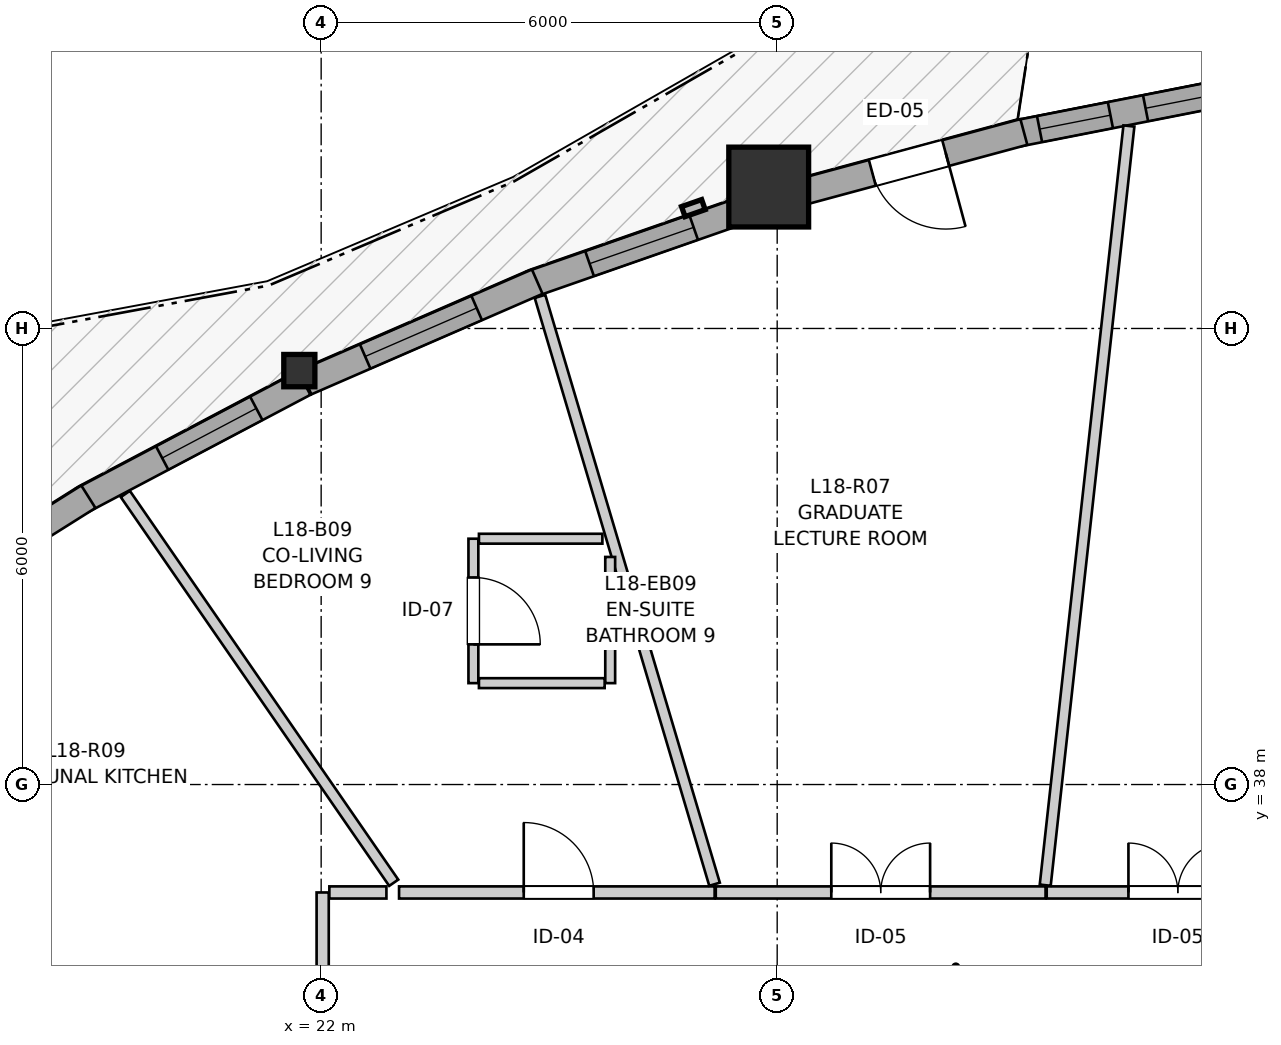
"""IFC4 building model, lengths in metres.
Left out: names, types, materials, properties, quantities, classifications, styles, units other than length and angle.
Written with IfcOpenShell. Run it as: python <this file> out.ifc"""

import sys

from ifc_helpers import new_model, si_unit, direction, frame, frame_2d, origin, origin_2d, place, context, subcontext, project, spatial, rectangle, i_section, extrude, source, transform, mapped, element, fill, save


model = new_model("IFC4")
c1 = context("Model", 3, precision=1e-05, world=origin(), true_north=direction((0.0, 1.0)))
c2 = subcontext(c1, "Body", "Model", "MODEL_VIEW")
j1 = project(units=[si_unit("LENGTHUNIT", "METRE"), si_unit("PLANEANGLEUNIT", "RADIAN")], contexts=[c1])
p1 = place(None, origin())
s1 = spatial("IfcSite", under=j1, at=p1, CompositionType="ELEMENT")
p2 = place(p1, origin())
s2 = spatial("IfcBuilding", under=s1, at=p2, CompositionType="ELEMENT")
p3 = place(p2, frame((0.0, 0.0, 62.2)))
s3 = spatial("IfcBuildingStorey", under=s2, at=p3, CompositionType="ELEMENT", Elevation=62.2)
m1 = source(origin(), c2, "Body", "SweptSolid", [
    extrude(rectangle(XDim=1.05, YDim=1.05, at=origin_2d()), origin(), (0.0, 0.0, 1.0), 2.9),
])
p4 = place(p3, frame((27.888, 45.861, 0.0), z_axis=(0.0, 0.0, 1.0), x_axis=(1.0, 0.0, 0.0)))
e1 = element("IfcColumn", 1, at=p4, inside=s3, PredefinedType="COLUMN", context=c2, shape_type="MappedRepresentation", body=[
    mapped(m1, transform((0.0, 0.0, 0.0), x_axis=(1.0, 0.0, 0.0), y_axis=(0.0, 1.0, 0.0), z_axis=(0.0, 0.0, 1.0), scale=1.0)),
])
m2 = source(origin(), c2, "Body", "SweptSolid", [
    extrude(i_section(OverallWidth=0.409, OverallDepth=0.425, WebThickness=0.03, FlangeThickness=0.048, FilletRadius=0.015, at=origin_2d()), origin(), (0.0, 0.0, 1.0), 2.9),
])
p5 = place(p3, frame((21.713, 43.446, 0.0), z_axis=(0.0, 0.0, 1.0), x_axis=(1.0, 0.0, 0.0)))
e2 = element("IfcColumn", 2, at=p5, inside=s3, PredefinedType="PILASTER", context=c2, shape_type="MappedRepresentation", body=[
    mapped(m2, transform((0.0, 0.0, 0.0), x_axis=(1.0, 0.0, 0.0), y_axis=(0.0, 1.0, 0.0), z_axis=(0.0, 0.0, 1.0), scale=1.0)),
])
p6 = place(p3, frame((34.577, 47.237, 0.0), z_axis=(0.0, 0.0, 1.0), x_axis=(-0.981238400755, -0.192798342532, 0.0)))
e3 = element("IfcWall", 3, at=p6, inside=s3, PredefinedType="SOLIDWALL", context=c2, shape_type="SweptSolid", body=[
    extrude(rectangle(XDim=3.482, YDim=0.35, at=frame_2d((1.741, 0.0))), origin(), (0.0, 0.0, 1.0), 2.38),
])
p7 = place(p6, frame((0.313, 0.0, 0.82)))
e4 = element("IfcOpeningElement", 4, at=p7, cuts=e3, PredefinedType="OPENING", context=c2, shape_type="SweptSolid", body=[
    extrude(rectangle(XDim=1.45, YDim=1.25, at=frame_2d((0.725, 0.625))), frame((0.0, 0.185, 0.0), z_axis=(0.0, -1.0, 0.0), x_axis=(1.0, 0.0, 0.0)), (0.0, 0.0, 1.0), 0.37),
])
p8 = place(p6, frame((2.234, 0.0, 0.82)))
e5 = element("IfcOpeningElement", 5, at=p8, cuts=e3, PredefinedType="OPENING", context=c2, shape_type="SweptSolid", body=[
    extrude(rectangle(XDim=0.95, YDim=1.35, at=frame_2d((0.475, 0.675))), frame((0.0, 0.185, 0.0), z_axis=(0.0, -1.0, 0.0), x_axis=(1.0, 0.0, 0.0)), (0.0, 0.0, 1.0), 0.37),
])
p9 = place(p3, frame((31.246, 46.585, 0.0), z_axis=(0.0, 0.0, 1.0), x_axis=(-0.965469506164, -0.260516089076, 0.0)))
e6 = element("IfcWall", 6, at=p9, inside=s3, PredefinedType="SOLIDWALL", context=c2, shape_type="SweptSolid", body=[
    extrude(rectangle(XDim=3.13, YDim=0.35, at=frame_2d((1.565, 0.0))), origin(), (0.0, 0.0, 1.0), 2.38),
])
p10 = place(p9, frame((1.065, 0.0, 0.0)))
e7 = element("IfcOpeningElement", 7, at=p10, cuts=e6, PredefinedType="OPENING", context=c2, shape_type="SweptSolid", body=[
    extrude(rectangle(XDim=1.0, YDim=2.1, at=frame_2d((0.5, 1.05))), frame((0.0, 0.185, 0.0), z_axis=(0.0, -1.0, 0.0), x_axis=(1.0, 0.0, 0.0)), (0.0, 0.0, 1.0), 0.37),
])
p11 = place(p3, frame((27.663, 45.596, 0.0), z_axis=(0.0, 0.0, 1.0), x_axis=(-0.944134113087, -0.329561491236, 0.0)))
e8 = element("IfcWall", 8, at=p11, inside=s3, PredefinedType="SOLIDWALL", context=c2, shape_type="SweptSolid", body=[
    extrude(rectangle(XDim=3.074, YDim=0.35, at=frame_2d((1.537, 0.0))), origin(), (0.0, 0.0, 1.0), 2.38),
])
p12 = place(p11, frame((0.807, 0.0, 0.82)))
e9 = element("IfcOpeningElement", 9, at=p12, cuts=e8, PredefinedType="OPENING", context=c2, shape_type="SweptSolid", body=[
    extrude(rectangle(XDim=1.45, YDim=1.25, at=frame_2d((0.725, 0.625))), frame((0.0, 0.185, 0.0), z_axis=(0.0, -1.0, 0.0), x_axis=(1.0, 0.0, 0.0)), (0.0, 0.0, 1.0), 0.37),
])
p13 = place(p3, frame((24.843, 44.615, 0.0), z_axis=(0.0, 0.0, 1.0), x_axis=(-0.917119193404, -0.398613076918, 0.0)))
e10 = element("IfcWall", 10, at=p13, inside=s3, PredefinedType="SOLIDWALL", context=c2, shape_type="SweptSolid", body=[
    extrude(rectangle(XDim=3.317, YDim=0.35, at=frame_2d((1.659, 0.0))), origin(), (0.0, 0.0, 1.0), 2.38),
])
p14 = place(p13, frame((0.869, 0.0, 0.82)))
e11 = element("IfcOpeningElement", 11, at=p14, cuts=e10, PredefinedType="OPENING", context=c2, shape_type="SweptSolid", body=[
    extrude(rectangle(XDim=1.6, YDim=1.35, at=frame_2d((0.8, 0.675))), frame((0.0, 0.185, 0.0), z_axis=(0.0, -1.0, 0.0), x_axis=(1.0, 0.0, 0.0)), (0.0, 0.0, 1.0), 0.37),
])
p15 = place(p3, frame((21.777, 43.281, 0.0), z_axis=(0.0, 0.0, 1.0), x_axis=(-0.884381357857, -0.466765052113, 0.0)))
e12 = element("IfcWall", 12, at=p15, inside=s3, PredefinedType="SOLIDWALL", context=c2, shape_type="SweptSolid", body=[
    extrude(rectangle(XDim=3.298, YDim=0.35, at=frame_2d((1.649, 0.0))), origin(), (0.0, 0.0, 1.0), 2.38),
])
p16 = place(p15, frame((0.713, 0.0, 0.82)))
e13 = element("IfcOpeningElement", 13, at=p16, cuts=e12, PredefinedType="OPENING", context=c2, shape_type="SweptSolid", body=[
    extrude(rectangle(XDim=1.4, YDim=1.35, at=frame_2d((0.7, 0.675))), frame((0.0, 0.185, 0.0), z_axis=(0.0, -1.0, 0.0), x_axis=(1.0, 0.0, 0.0)), (0.0, 0.0, 1.0), 0.37),
])
p17 = place(p3, frame((18.937, 41.787, 0.0), z_axis=(0.0, 0.0, 1.0), x_axis=(-0.84639489148, -0.532555807101, 0.0)))
e14 = element("IfcWall", 14, at=p17, inside=s3, PredefinedType="SOLIDWALL", context=c2, shape_type="SweptSolid", body=[
    extrude(rectangle(XDim=3.018, YDim=0.35, at=frame_2d((1.509, 0.0))), origin(), (0.0, 0.0, 1.0), 2.38),
])
p18 = place(p17, frame((0.889, 0.0, 0.82)))
e15 = element("IfcOpeningElement", 15, at=p18, cuts=e14, PredefinedType="OPENING", context=c2, shape_type="SweptSolid", body=[
    extrude(rectangle(XDim=1.25, YDim=1.35, at=frame_2d((0.625, 0.675))), frame((0.0, 0.185, 0.0), z_axis=(0.0, -1.0, 0.0), x_axis=(1.0, 0.0, 0.0)), (0.0, 0.0, 1.0), 0.37),
])
p19 = place(p3, frame((27.192, 36.58, 0.0), z_axis=(0.0, 0.0, 1.0), x_axis=(1.0, 0.0, 0.0)))
e16 = element("IfcWall", 16, at=p19, inside=s3, PredefinedType="PARTITIONING", context=c2, shape_type="SweptSolid", body=[
    extrude(rectangle(XDim=4.339, YDim=0.16, at=frame_2d((2.169, 0.0))), origin(), (0.0, 0.0, 1.0), 2.9),
])
p20 = place(p19, frame((1.52, 0.0, 0.0)))
e17 = element("IfcOpeningElement", 17, at=p20, cuts=e16, PredefinedType="OPENING", context=c2, shape_type="SweptSolid", body=[
    extrude(rectangle(XDim=1.3, YDim=2.1, at=frame_2d((0.65, 1.05))), frame((0.0, 0.09, 0.0), z_axis=(0.0, -1.0, 0.0), x_axis=(1.0, 0.0, 0.0)), (0.0, 0.0, 1.0), 0.18),
])
p21 = place(p3, frame((23.025, 36.58, 0.0), z_axis=(0.0, 0.0, 1.0), x_axis=(1.0, 0.0, 0.0)))
e18 = element("IfcWall", 18, at=p21, inside=s3, PredefinedType="PARTITIONING", context=c2, shape_type="SweptSolid", body=[
    extrude(rectangle(XDim=4.152, YDim=0.16, at=frame_2d((2.076, 0.0))), origin(), (0.0, 0.0, 1.0), 2.508),
])
p22 = place(p21, frame((1.64, 0.0, 0.0)))
e19 = element("IfcOpeningElement", 19, at=p22, cuts=e18, PredefinedType="OPENING", context=c2, shape_type="SweptSolid", body=[
    extrude(rectangle(XDim=0.92, YDim=2.1, at=frame_2d((0.46, 1.05))), frame((0.0, 0.09, 0.0), z_axis=(0.0, -1.0, 0.0), x_axis=(1.0, 0.0, 0.0)), (0.0, 0.0, 1.0), 0.18),
])
p23 = place(p3, frame((22.02, 32.578, 0.0), z_axis=(0.0, 0.0, 1.0), x_axis=(0.0, 1.0, 0.0)))
e20 = element("IfcWall", 20, at=p23, inside=s3, PredefinedType="PARTITIONING", context=c2, shape_type="SweptSolid", body=[
    extrude(rectangle(XDim=4.002, YDim=0.16, at=frame_2d((2.001, 0.0))), origin(), (0.0, 0.0, 1.0), 2.9),
])
p24 = place(p23, frame((1.361, 0.0, 0.0)))
e21 = element("IfcOpeningElement", 21, at=p24, cuts=e20, PredefinedType="OPENING", context=c2, shape_type="SweptSolid", body=[
    extrude(rectangle(XDim=1.3, YDim=2.1, at=frame_2d((0.65, 1.05))), frame((0.0, 0.09, 0.0), z_axis=(0.0, -1.0, 0.0), x_axis=(1.0, 0.0, 0.0)), (0.0, 0.0, 1.0), 0.18),
])
p25 = place(p3, frame((31.546, 36.58, 0.0), z_axis=(0.0, 0.0, 1.0), x_axis=(1.0, 0.0, 0.0)))
e22 = element("IfcWall", 22, at=p25, inside=s3, PredefinedType="PARTITIONING", context=c2, shape_type="SweptSolid", body=[
    extrude(rectangle(XDim=3.45, YDim=0.16, at=frame_2d((1.725, 0.0))), origin(), (0.0, 0.0, 1.0), 2.9),
])
p26 = place(p25, frame((1.075, 0.0, 0.0)))
e23 = element("IfcOpeningElement", 23, at=p26, cuts=e22, PredefinedType="OPENING", context=c2, shape_type="SweptSolid", body=[
    extrude(rectangle(XDim=1.3, YDim=2.1, at=frame_2d((0.65, 1.05))), frame((0.0, 0.09, 0.0), z_axis=(0.0, -1.0, 0.0), x_axis=(1.0, 0.0, 0.0)), (0.0, 0.0, 1.0), 0.18),
])
p27 = place(p3, frame((24.003, 41.234, 0.0), z_axis=(0.0, 0.0, 1.0), x_axis=(0.0, -1.0, 0.0)))
e24 = element("IfcWall", 24, at=p27, inside=s3, PredefinedType="PARTITIONING", context=c2, shape_type="SweptSolid", body=[
    extrude(rectangle(XDim=1.9, YDim=0.13, at=frame_2d((0.95, 0.0))), origin(), (0.0, 0.0, 1.0), 2.9),
])
p28 = place(p27, frame((0.51, 0.0, 0.0)))
e25 = element("IfcOpeningElement", 25, at=p28, cuts=e24, PredefinedType="OPENING", context=c2, shape_type="SweptSolid", body=[
    extrude(rectangle(XDim=0.88, YDim=2.05, at=frame_2d((0.44, 1.025))), frame((0.0, 0.075, 0.0), z_axis=(0.0, -1.0, 0.0), x_axis=(1.0, 0.0, 0.0)), (0.0, 0.0, 1.0), 0.15),
])
p29 = place(p3, frame((31.527, 36.676, 0.0), z_axis=(0.0, 0.0, 1.0), x_axis=(0.109575491405, 0.993978476469, 0.0)))
e26 = element("IfcWall", 26, at=p29, inside=s3, PredefinedType="PARTITIONING", context=c2, shape_type="SweptSolid", body=[
    extrude(rectangle(XDim=10.049, YDim=0.145, at=frame_2d((5.024, 0.0))), origin(), (0.0, 0.0, 1.0), 2.9),
])
p30 = place(p3, frame((14.494, 38.558, 0.0), z_axis=(0.0, 0.0, 1.0), x_axis=(0.783879440631, -0.620913055552, 0.0)))
e27 = element("IfcWall", 27, at=p30, inside=s3, PredefinedType="PARTITIONING", context=c2, shape_type="SweptSolid", body=[
    extrude(rectangle(XDim=9.434, YDim=0.145, at=frame_2d((4.717, 0.0))), origin(), (0.0, 0.0, 1.0), 2.9),
])
p31 = place(p3, frame((24.879, 44.422, 0.0), z_axis=(0.0, 0.0, 1.0), x_axis=(0.284634354208, -0.958636158511, 0.0)))
e28 = element("IfcWall", 28, at=p31, inside=s3, PredefinedType="PARTITIONING", context=c2, shape_type="SweptSolid", body=[
    extrude(rectangle(XDim=8.068, YDim=0.145, at=frame_2d((4.034, 0.0))), origin(), (0.0, 0.0, 1.0), 2.9),
])
p32 = place(p3, frame((19.423, 41.823, 0.0), z_axis=(0.0, 0.0, 1.0), x_axis=(0.568159686118, -0.822918325881, 0.0)))
e29 = element("IfcWall", 29, at=p32, inside=s3, PredefinedType="PARTITIONING", context=c2, shape_type="SweptSolid", body=[
    extrude(rectangle(XDim=6.216, YDim=0.145, at=frame_2d((3.108, 0.0))), origin(), (0.0, 0.0, 1.0), 2.9),
])
p33 = place(p3, frame((25.803, 39.334, 0.0), z_axis=(0.0, 0.0, 1.0), x_axis=(0.0, 1.0, 0.0)))
e30 = element("IfcWall", 30, at=p33, inside=s3, PredefinedType="PARTITIONING", context=c2, shape_type="SweptSolid", body=[
    extrude(rectangle(XDim=1.66, YDim=0.13, at=frame_2d((0.83, 0.0))), origin(), (0.0, 0.0, 1.0), 2.9),
])
p34 = place(p3, frame((24.076, 41.234, 0.0), z_axis=(0.0, 0.0, 1.0), x_axis=(1.0, 0.0, 0.0)))
e31 = element("IfcWall", 31, at=p34, inside=s3, PredefinedType="PARTITIONING", context=c2, shape_type="SweptSolid", body=[
    extrude(rectangle(XDim=1.624, YDim=0.13, at=frame_2d((0.812, 0.0))), origin(), (0.0, 0.0, 1.0), 2.9),
])
p35 = place(p3, frame((24.076, 39.334, 0.0), z_axis=(0.0, 0.0, 1.0), x_axis=(1.0, 0.0, 0.0)))
e32 = element("IfcWall", 32, at=p35, inside=s3, PredefinedType="PARTITIONING", context=c2, shape_type="SweptSolid", body=[
    extrude(rectangle(XDim=1.654, YDim=0.13, at=frame_2d((0.827, 0.0))), origin(), (0.0, 0.0, 1.0), 2.9),
])
p36 = place(p3, frame((22.108, 36.58, 0.0), z_axis=(0.0, 0.0, 1.0), x_axis=(1.0, 0.0, 0.0)))
e33 = element("IfcWall", 33, at=p36, inside=s3, PredefinedType="PARTITIONING", context=c2, shape_type="SweptSolid", body=[
    extrude(rectangle(XDim=0.751, YDim=0.16, at=frame_2d((0.375, 0.0))), origin(), (0.0, 0.0, 1.0), 2.9),
])
m3 = source(origin(), c2, "Body", "SweptSolid", [
    extrude(rectangle(XDim=1.45, YDim=1.25, at=frame_2d((0.725, 0.625))), frame((0.0, 0.03, 0.0), z_axis=(0.0, -1.0, 0.0), x_axis=(1.0, 0.0, 0.0)), (0.0, 0.0, 1.0), 0.06),
])
p37 = place(p7, origin())
e34 = element("IfcWindow", 34, at=p37, inside=s3, PartitioningType="SINGLE_PANEL", PredefinedType="WINDOW", context=c2, shape_type="MappedRepresentation", body=[
    mapped(m3, transform((0.0, 0.0, 0.0), x_axis=(1.0, 0.0, 0.0), y_axis=(0.0, 1.0, 0.0), z_axis=(0.0, 0.0, 1.0), scale=1.0)),
])
fill(e4, e34)
m4 = source(origin(), c2, "Body", "SweptSolid", [
    extrude(rectangle(XDim=0.95, YDim=1.35, at=frame_2d((0.475, 0.675))), frame((0.0, 0.03, 0.0), z_axis=(0.0, -1.0, 0.0), x_axis=(1.0, 0.0, 0.0)), (0.0, 0.0, 1.0), 0.06),
])
p38 = place(p8, origin())
e35 = element("IfcWindow", 35, at=p38, inside=s3, PartitioningType="SINGLE_PANEL", PredefinedType="WINDOW", context=c2, shape_type="MappedRepresentation", body=[
    mapped(m4, transform((0.0, 0.0, 0.0), x_axis=(1.0, 0.0, 0.0), y_axis=(0.0, 1.0, 0.0), z_axis=(0.0, 0.0, 1.0), scale=1.0)),
])
fill(e5, e35)
p39 = place(p12, origin())
e36 = element("IfcWindow", 36, at=p39, inside=s3, PartitioningType="SINGLE_PANEL", PredefinedType="WINDOW", context=c2, shape_type="MappedRepresentation", body=[
    mapped(m3, transform((0.0, 0.0, 0.0), x_axis=(1.0, 0.0, 0.0), y_axis=(0.0, 1.0, 0.0), z_axis=(0.0, 0.0, 1.0), scale=1.0)),
])
fill(e9, e36)
m5 = source(origin(), c2, "Body", "SweptSolid", [
    extrude(rectangle(XDim=1.6, YDim=1.35, at=frame_2d((0.8, 0.675))), frame((0.0, 0.03, 0.0), z_axis=(0.0, -1.0, 0.0), x_axis=(1.0, 0.0, 0.0)), (0.0, 0.0, 1.0), 0.06),
])
p40 = place(p14, origin())
e37 = element("IfcWindow", 37, at=p40, inside=s3, PartitioningType="SINGLE_PANEL", PredefinedType="WINDOW", context=c2, shape_type="MappedRepresentation", body=[
    mapped(m5, transform((0.0, 0.0, 0.0), x_axis=(1.0, 0.0, 0.0), y_axis=(0.0, 1.0, 0.0), z_axis=(0.0, 0.0, 1.0), scale=1.0)),
])
fill(e11, e37)
m6 = source(origin(), c2, "Body", "SweptSolid", [
    extrude(rectangle(XDim=1.4, YDim=1.35, at=frame_2d((0.7, 0.675))), frame((0.0, 0.03, 0.0), z_axis=(0.0, -1.0, 0.0), x_axis=(1.0, 0.0, 0.0)), (0.0, 0.0, 1.0), 0.06),
])
p41 = place(p16, origin())
e38 = element("IfcWindow", 38, at=p41, inside=s3, PartitioningType="SINGLE_PANEL", PredefinedType="WINDOW", context=c2, shape_type="MappedRepresentation", body=[
    mapped(m6, transform((0.0, 0.0, 0.0), x_axis=(1.0, 0.0, 0.0), y_axis=(0.0, 1.0, 0.0), z_axis=(0.0, 0.0, 1.0), scale=1.0)),
])
fill(e13, e38)
m7 = source(origin(), c2, "Body", "SweptSolid", [
    extrude(rectangle(XDim=1.0, YDim=2.1, at=frame_2d((0.5, 1.05))), frame((0.0, 0.025, 0.0), z_axis=(0.0, -1.0, 0.0), x_axis=(1.0, 0.0, 0.0)), (0.0, 0.0, 1.0), 0.05),
])
p42 = place(p10, origin())
e39 = element("IfcDoor", 39, at=p42, inside=s3, OperationType="SINGLE_SWING_LEFT", PredefinedType="DOOR", context=c2, shape_type="MappedRepresentation", body=[
    mapped(m7, transform((0.0, 0.0, 0.0), x_axis=(1.0, 0.0, 0.0), y_axis=(0.0, 1.0, 0.0), z_axis=(0.0, 0.0, 1.0), scale=1.0)),
])
fill(e7, e39)
m8 = source(origin(), c2, "Body", "SweptSolid", [
    extrude(rectangle(XDim=1.3, YDim=2.1, at=frame_2d((0.65, 1.05))), frame((0.0, 0.025, 0.0), z_axis=(0.0, -1.0, 0.0), x_axis=(1.0, 0.0, 0.0)), (0.0, 0.0, 1.0), 0.05),
])
p43 = place(p20, origin())
e40 = element("IfcDoor", 40, at=p43, inside=s3, OperationType="DOUBLE_DOOR_SINGLE_SWING", PredefinedType="DOOR", context=c2, shape_type="MappedRepresentation", body=[
    mapped(m8, transform((0.0, 0.0, 0.0), x_axis=(1.0, 0.0, 0.0), y_axis=(0.0, 1.0, 0.0), z_axis=(0.0, 0.0, 1.0), scale=1.0)),
])
fill(e17, e40)
m9 = source(origin(), c2, "Body", "SweptSolid", [
    extrude(rectangle(XDim=0.92, YDim=2.1, at=frame_2d((0.46, 1.05))), frame((0.0, 0.025, 0.0), z_axis=(0.0, -1.0, 0.0), x_axis=(1.0, 0.0, 0.0)), (0.0, 0.0, 1.0), 0.05),
])
p44 = place(p22, origin())
e41 = element("IfcDoor", 41, at=p44, inside=s3, OperationType="SINGLE_SWING_LEFT", PredefinedType="DOOR", context=c2, shape_type="MappedRepresentation", body=[
    mapped(m9, transform((0.0, 0.0, 0.0), x_axis=(1.0, 0.0, 0.0), y_axis=(0.0, 1.0, 0.0), z_axis=(0.0, 0.0, 1.0), scale=1.0)),
])
fill(e19, e41)
p45 = place(p26, origin())
e42 = element("IfcDoor", 42, at=p45, inside=s3, OperationType="DOUBLE_DOOR_SINGLE_SWING", PredefinedType="DOOR", context=c2, shape_type="MappedRepresentation", body=[
    mapped(m8, transform((0.0, 0.0, 0.0), x_axis=(1.0, 0.0, 0.0), y_axis=(0.0, 1.0, 0.0), z_axis=(0.0, 0.0, 1.0), scale=1.0)),
])
fill(e23, e42)
m10 = source(origin(), c2, "Body", "SweptSolid", [
    extrude(rectangle(XDim=0.88, YDim=2.05, at=frame_2d((0.44, 1.025))), frame((0.0, 0.025, 0.0), z_axis=(0.0, -1.0, 0.0), x_axis=(1.0, 0.0, 0.0)), (0.0, 0.0, 1.0), 0.05),
])
p46 = place(p28, origin())
e43 = element("IfcDoor", 43, at=p46, inside=s3, OperationType="SINGLE_SWING_RIGHT", PredefinedType="DOOR", context=c2, shape_type="MappedRepresentation", body=[
    mapped(m10, transform((0.0, 0.0, 0.0), x_axis=(1.0, 0.0, 0.0), y_axis=(0.0, 1.0, 0.0), z_axis=(0.0, 0.0, 1.0), scale=1.0)),
])
fill(e25, e43)
save(model, sys.argv[1])
